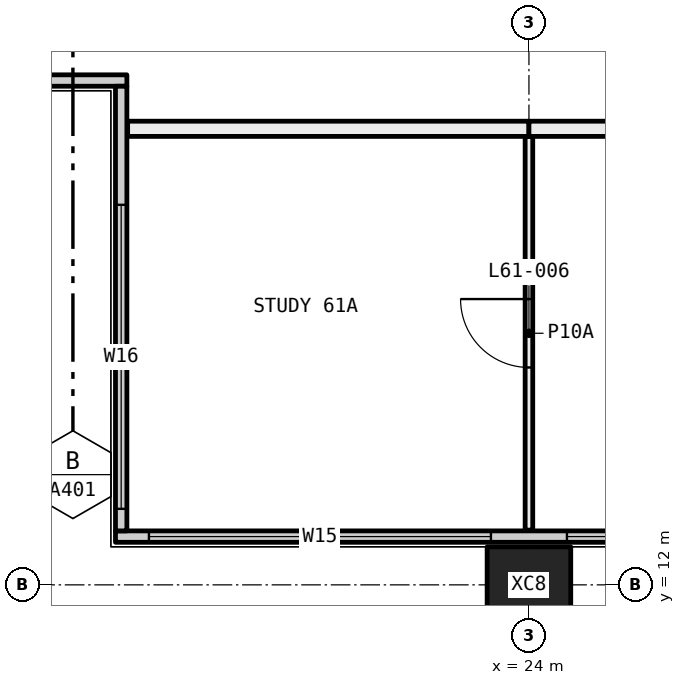
"""IFC4 building model, lengths in metres.
Left out: names, types, materials, properties, quantities, classifications, styles, units other than length and angle.
Written with IfcOpenShell. Run it as: python <this file> out.ifc"""

import sys

from ifc_helpers import new_model, si_unit, direction, frame, frame_2d, origin, origin_2d, place, context, subcontext, project, spatial, rectangle, hollow_rectangle, extrude, element, fill, save


model = new_model("IFC4")
c1 = context("Model", 3, precision=1e-05, world=origin(), true_north=direction((0.0, 1.0)))
c2 = subcontext(c1, "Body", "Model", "MODEL_VIEW")
j1 = project(units=[si_unit("LENGTHUNIT", "METRE"), si_unit("PLANEANGLEUNIT", "RADIAN")], contexts=[c1])
p1 = place(None, origin())
s1 = spatial("IfcSite", under=j1, at=p1, CompositionType="ELEMENT")
p2 = place(p1, origin())
s2 = spatial("IfcBuilding", under=s1, at=p2, CompositionType="ELEMENT")
p3 = place(p2, frame((0.0, 0.0, 228.3)))
s3 = spatial("IfcBuildingStorey", under=s2, at=p3, CompositionType="ELEMENT", Elevation=228.3)
p4 = place(p3, frame((24.0, 12.0, -0.4), z_axis=(0.0, 0.0, 1.0), x_axis=(1.0, 0.0, 0.0)))
e1 = element("IfcColumn", 1, at=p4, inside=s3, PredefinedType="COLUMN", context=c2, shape_type="SweptSolid", body=[
    extrude(hollow_rectangle(XDim=1.1, YDim=1.0, WallThickness=0.04, at=origin_2d()), origin(), (0.0, 0.0, 1.0), 3.45),
])
p5 = place(p3, frame((18.56, 12.635, 0.0), z_axis=(0.0, 0.0, 1.0), x_axis=(1.0, 0.0, 0.0)))
e2 = element("IfcWall", 2, at=p5, inside=s3, PredefinedType="ELEMENTEDWALL", context=c2, shape_type="SweptSolid", body=[
    extrude(rectangle(XDim=34.88, YDim=0.15, at=frame_2d((17.44, 0.0))), origin(), (0.0, 0.0, 1.0), 3.05),
])
p6 = place(p5, frame((0.44, 0.0, 0.45)))
e3 = element("IfcOpeningElement", 3, at=p6, cuts=e2, PredefinedType="OPENING", context=c2, shape_type="SweptSolid", body=[
    extrude(rectangle(XDim=4.5, YDim=2.55, at=frame_2d((2.25, 1.275))), frame((0.0, 0.085, 0.0), z_axis=(0.0, -1.0, 0.0), x_axis=(1.0, 0.0, 0.0)), (0.0, 0.0, 1.0), 0.17),
])
p7 = place(p5, frame((5.94, 0.0, 0.45)))
e4 = element("IfcOpeningElement", 4, at=p7, cuts=e2, PredefinedType="OPENING", context=c2, shape_type="SweptSolid", body=[
    extrude(rectangle(XDim=3.0, YDim=2.55, at=frame_2d((1.5, 1.275))), frame((0.0, 0.085, 0.0), z_axis=(0.0, -1.0, 0.0), x_axis=(1.0, 0.0, 0.0)), (0.0, 0.0, 1.0), 0.17),
])
p8 = place(p5, frame((14.94, 0.0, 0.45)))
e5 = element("IfcOpeningElement", 5, at=p8, cuts=e2, PredefinedType="OPENING", context=c2, shape_type="SweptSolid", body=[
    extrude(rectangle(XDim=2.0, YDim=2.55, at=frame_2d((1.0, 1.275))), frame((0.0, 0.085, 0.0), z_axis=(0.0, -1.0, 0.0), x_axis=(1.0, 0.0, 0.0)), (0.0, 0.0, 1.0), 0.17),
])
p9 = place(p5, frame((17.94, 0.0, 0.45)))
e6 = element("IfcOpeningElement", 6, at=p9, cuts=e2, PredefinedType="OPENING", context=c2, shape_type="SweptSolid", body=[
    extrude(rectangle(XDim=3.0, YDim=2.55, at=frame_2d((1.5, 1.275))), frame((0.0, 0.085, 0.0), z_axis=(0.0, -1.0, 0.0), x_axis=(1.0, 0.0, 0.0)), (0.0, 0.0, 1.0), 0.17),
])
p10 = place(p5, frame((25.94, 0.0, 0.45)))
e7 = element("IfcOpeningElement", 7, at=p10, cuts=e2, PredefinedType="OPENING", context=c2, shape_type="SweptSolid", body=[
    extrude(rectangle(XDim=3.0, YDim=2.55, at=frame_2d((1.5, 1.275))), frame((0.0, 0.085, 0.0), z_axis=(0.0, -1.0, 0.0), x_axis=(1.0, 0.0, 0.0)), (0.0, 0.0, 1.0), 0.17),
])
p11 = place(p5, frame((29.94, 0.0, 0.45)))
e8 = element("IfcOpeningElement", 8, at=p11, cuts=e2, PredefinedType="OPENING", context=c2, shape_type="SweptSolid", body=[
    extrude(rectangle(XDim=4.5, YDim=2.55, at=frame_2d((2.25, 1.275))), frame((0.0, 0.085, 0.0), z_axis=(0.0, -1.0, 0.0), x_axis=(1.0, 0.0, 0.0)), (0.0, 0.0, 1.0), 0.17),
])
p12 = place(p3, frame((12.56, 18.635, 0.0), z_axis=(0.0, 0.0, 1.0), x_axis=(1.0, 0.0, 0.0)))
e9 = element("IfcWall", 9, at=p12, inside=s3, PredefinedType="ELEMENTEDWALL", context=c2, shape_type="SweptSolid", body=[
    extrude(rectangle(XDim=6.15, YDim=0.15, at=frame_2d((3.075, 0.0))), origin(), (0.0, 0.0, 1.0), 3.05),
])
p13 = place(p12, frame((0.44, 0.0, 0.45)))
e10 = element("IfcOpeningElement", 10, at=p13, cuts=e9, PredefinedType="OPENING", context=c2, shape_type="SweptSolid", body=[
    extrude(rectangle(XDim=4.0, YDim=2.55, at=frame_2d((2.0, 1.275))), frame((0.0, 0.085, 0.0), z_axis=(0.0, -1.0, 0.0), x_axis=(1.0, 0.0, 0.0)), (0.0, 0.0, 1.0), 0.17),
])
p14 = place(p3, frame((18.635, 12.71, 0.0), z_axis=(0.0, 0.0, 1.0), x_axis=(0.0, 1.0, 0.0)))
e11 = element("IfcWall", 11, at=p14, inside=s3, PredefinedType="ELEMENTEDWALL", context=c2, shape_type="SweptSolid", body=[
    extrude(rectangle(XDim=5.85, YDim=0.15, at=frame_2d((2.925, 0.0))), origin(), (0.0, 0.0, 1.0), 3.05),
])
p15 = place(p14, frame((0.29, 0.0, 0.45)))
e12 = element("IfcOpeningElement", 12, at=p15, cuts=e11, PredefinedType="OPENING", context=c2, shape_type="SweptSolid", body=[
    extrude(rectangle(XDim=4.0, YDim=2.55, at=frame_2d((2.0, 1.275))), frame((0.0, 0.085, 0.0), z_axis=(0.0, -1.0, 0.0), x_axis=(1.0, 0.0, 0.0)), (0.0, 0.0, 1.0), 0.17),
])
p16 = place(p3, frame((24.0, 12.72, 0.0), z_axis=(0.0, 0.0, 1.0), x_axis=(0.0, 1.0, 0.0)))
e13 = element("IfcWall", 13, at=p16, inside=s3, PredefinedType="PARTITIONING", context=c2, shape_type="SweptSolid", body=[
    extrude(rectangle(XDim=5.18, YDim=0.1, at=frame_2d((2.59, 0.0))), origin(), (0.0, 0.0, 1.0), 3.05),
])
p17 = place(p16, frame((2.14, 0.0, 0.0)))
e14 = element("IfcOpeningElement", 14, at=p17, cuts=e13, PredefinedType="OPENING", context=c2, shape_type="SweptSolid", body=[
    extrude(rectangle(XDim=0.9, YDim=2.1, at=frame_2d((0.45, 1.05))), frame((0.0, 0.06, 0.0), z_axis=(0.0, -1.0, 0.0), x_axis=(1.0, 0.0, 0.0)), (0.0, 0.0, 1.0), 0.12),
])
p18 = place(p3, frame((24.0, 18.0, 0.0), z_axis=(0.0, 0.0, 1.0), x_axis=(-1.0, 0.0, 0.0)))
e15 = element("IfcWall", 15, at=p18, inside=s3, PredefinedType="PARTITIONING", context=c2, shape_type="SweptSolid", body=[
    extrude(rectangle(XDim=5.28, YDim=0.2, at=frame_2d((2.64, 0.0))), origin(), (0.0, 0.0, 1.0), 3.05),
])
p19 = place(p3, frame((25.9, 18.0, 0.0), z_axis=(0.0, 0.0, 1.0), x_axis=(-1.0, 0.0, 0.0)))
e16 = element("IfcWall", 16, at=p19, inside=s3, PredefinedType="PARTITIONING", context=c2, shape_type="SweptSolid", body=[
    extrude(rectangle(XDim=1.9, YDim=0.2, at=frame_2d((0.95, 0.0))), origin(), (0.0, 0.0, 1.0), 3.05),
])
p20 = place(p6, origin())
e17 = element("IfcWindow", 17, at=p20, inside=s3, PartitioningType="SINGLE_PANEL", PredefinedType="WINDOW", context=c2, shape_type="SweptSolid", body=[
    extrude(rectangle(XDim=4.5, YDim=2.55, at=frame_2d((2.25, 1.275))), frame((0.0, 0.03, 0.0), z_axis=(0.0, -1.0, 0.0), x_axis=(1.0, 0.0, 0.0)), (0.0, 0.0, 1.0), 0.06),
])
fill(e3, e17)
p21 = place(p7, origin())
e18 = element("IfcWindow", 18, at=p21, inside=s3, PartitioningType="SINGLE_PANEL", PredefinedType="WINDOW", context=c2, shape_type="SweptSolid", body=[
    extrude(rectangle(XDim=3.0, YDim=2.55, at=frame_2d((1.5, 1.275))), frame((0.0, 0.03, 0.0), z_axis=(0.0, -1.0, 0.0), x_axis=(1.0, 0.0, 0.0)), (0.0, 0.0, 1.0), 0.06),
])
fill(e4, e18)
p22 = place(p15, origin())
e19 = element("IfcWindow", 19, at=p22, inside=s3, PartitioningType="SINGLE_PANEL", PredefinedType="WINDOW", context=c2, shape_type="SweptSolid", body=[
    extrude(rectangle(XDim=4.0, YDim=2.55, at=frame_2d((2.0, 1.275))), frame((0.0, 0.03, 0.0), z_axis=(0.0, -1.0, 0.0), x_axis=(1.0, 0.0, 0.0)), (0.0, 0.0, 1.0), 0.06),
])
fill(e12, e19)
p23 = place(p17, origin())
e20 = element("IfcDoor", 20, at=p23, inside=s3, OperationType="SINGLE_SWING_LEFT", PredefinedType="DOOR", context=c2, shape_type="SweptSolid", body=[
    extrude(rectangle(XDim=0.9, YDim=2.1, at=frame_2d((0.45, 1.05))), frame((0.0, 0.025, 0.0), z_axis=(0.0, -1.0, 0.0), x_axis=(1.0, 0.0, 0.0)), (0.0, 0.0, 1.0), 0.05),
])
fill(e14, e20)
save(model, sys.argv[1])
